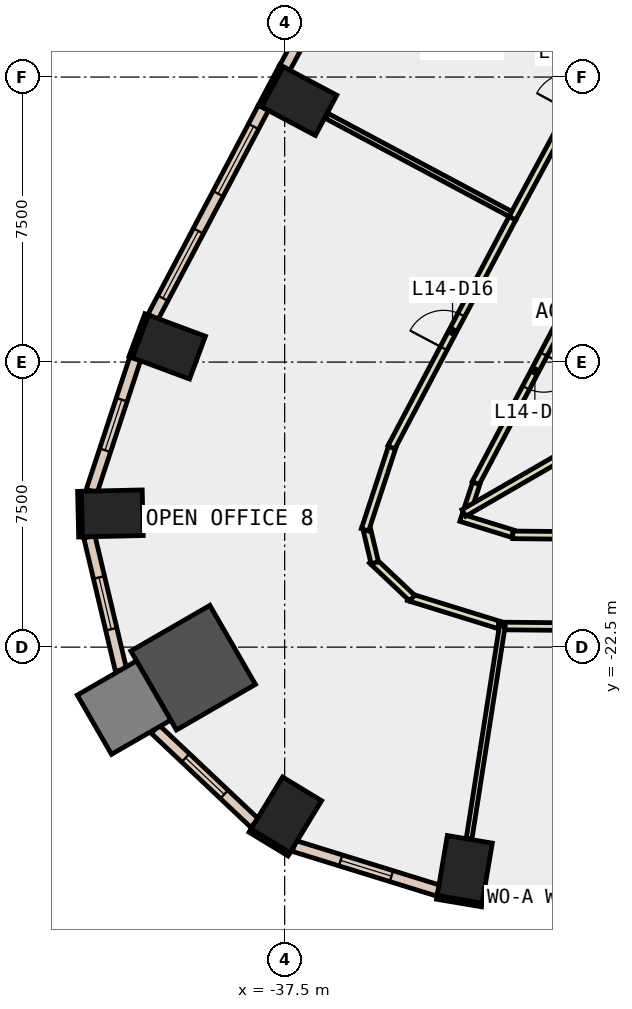
"""IFC4 building model, lengths in metres.
Left out: names, types, materials, properties, quantities, classifications, styles, units other than length and angle.
Written with IfcOpenShell. Run it as: python <this file> out.ifc"""

import sys

from ifc_helpers import new_model, si_unit, direction, frame, frame_2d, origin, origin_2d, place, context, subcontext, project, spatial, rectangle, extrude, element, fill, save


model = new_model("IFC4")
c1 = context("Model", 3, precision=1e-05, world=origin(), true_north=direction((0.0, 1.0)))
c2 = subcontext(c1, "Body", "Model", "MODEL_VIEW")
j1 = project(units=[si_unit("LENGTHUNIT", "METRE"), si_unit("PLANEANGLEUNIT", "RADIAN")], contexts=[c1])
p1 = place(None, origin())
s1 = spatial("IfcSite", under=j1, at=p1, CompositionType="ELEMENT")
p2 = place(p1, origin())
s2 = spatial("IfcBuilding", under=s1, at=p2, CompositionType="ELEMENT")
p3 = place(p2, frame((0.0, 0.0, 68.6)))
s3 = spatial("IfcBuildingStorey", under=s2, at=p3, CompositionType="ELEMENT", Elevation=68.6)
for number, where, z_axis, x_axis in (
    (1, (-32.761, -28.346, -0.4), (0.0, 0.0, 1.0), (-0.986, 0.167, 0.0)),
    (2, (-37.117, -8.132, -0.4), (0.0, 0.0, 1.0), (0.469, 0.883, 0.0)),
    (3, (-40.544, -14.604, -0.4), (0.0, 0.0, 1.0), (0.348, 0.937, 0.0)),
    (4, (-42.035, -18.982, -0.4), (0.0, 0.0, 1.0), (-0.023, 1.0, 0.0)),
):
    element("IfcColumn", number, at=place(p3, frame(where, z_axis=z_axis, x_axis=x_axis)), inside=s3, PredefinedType="COLUMN", context=c2, shape_type="SweptSolid", body=[
        extrude(rectangle(XDim=1.2, YDim=1.6, at=origin_2d()), origin(), (0.0, 0.0, 1.0), 4.2),
    ])
p4 = place(p3, frame((-39.908, -23.041, -0.4), z_axis=(0.0, 0.0, 1.0), x_axis=(0.866025403784, 0.5, 0.0)))
e5 = element("IfcColumn", 5, at=p4, inside=s3, PredefinedType="COLUMN", context=c2, shape_type="SweptSolid", body=[
    extrude(rectangle(XDim=2.4, YDim=2.4, at=origin_2d()), origin(), (0.0, 0.0, 1.0), 4.2),
])
p5 = place(p3, frame((-37.457, -26.913, -0.4), z_axis=(0.0, 0.0, 1.0), x_axis=(-0.854522294989, 0.519414716163, 0.0)))
e6 = element("IfcColumn", 6, at=p5, inside=s3, PredefinedType="COLUMN", context=c2, shape_type="SweptSolid", body=[
    extrude(rectangle(XDim=1.2, YDim=1.6, at=origin_2d()), origin(), (0.0, 0.0, 1.0), 4.2),
])
p6 = place(p3, frame((-41.727, -24.091, -0.4), z_axis=(0.0, 0.0, 1.0), x_axis=(0.866025403784, 0.5, 0.0)))
e7 = element("IfcColumn", 7, at=p6, inside=s3, PredefinedType="COLUMN", context=c2, shape_type="SweptSolid", body=[
    extrude(rectangle(XDim=1.8, YDim=1.8, at=origin_2d()), origin(), (0.0, 0.0, 1.0), 4.2),
])
p7 = place(p3, frame((-37.586, -7.204, 0.0), z_axis=(0.0, 0.0, 1.0), x_axis=(-0.469467784567, -0.882949601763, 0.0)))
e8 = element("IfcWall", 8, at=p7, inside=s3, PredefinedType="STANDARD", context=c2, shape_type="SweptSolid", body=[
    extrude(rectangle(XDim=1.199, YDim=0.1, at=frame_2d((0.6, 0.0))), origin(), (0.0, 0.0, 1.0), 3.8),
])
p8 = place(p3, frame((-41.132, -13.746, 0.0), z_axis=(0.0, 0.0, 1.0), x_axis=(-0.348268249601, -0.937394914814, 0.0)))
e9 = element("IfcWall", 9, at=p8, inside=s3, PredefinedType="STANDARD", context=c2, shape_type="SweptSolid", body=[
    extrude(rectangle(XDim=1.2, YDim=0.1, at=frame_2d((0.6, 0.0))), origin(), (0.0, 0.0, 1.0), 3.8),
])
p9 = place(p3, frame((-33.494, -29.084, 0.0), z_axis=(0.0, 0.0, 1.0), x_axis=(0.986011774526, -0.166675674579, 0.0)))
e10 = element("IfcWall", 10, at=p9, inside=s3, PredefinedType="STANDARD", context=c2, shape_type="SweptSolid", body=[
    extrude(rectangle(XDim=1.2, YDim=0.1, at=frame_2d((0.6, 0.0))), origin(), (0.0, 0.0, 1.0), 3.8),
])
p10 = place(p3, frame((-42.899, -18.401, 0.0), z_axis=(0.0, 0.0, 1.0), x_axis=(0.023183352363, -0.999731229968, 0.0)))
e11 = element("IfcWall", 11, at=p10, inside=s3, PredefinedType="STANDARD", context=c2, shape_type="SweptSolid", body=[
    extrude(rectangle(XDim=1.2, YDim=0.1, at=frame_2d((0.6, 0.0))), origin(), (0.0, 0.0, 1.0), 3.8),
])
p11 = place(p3, frame((-38.411, -27.328, 0.0), z_axis=(0.0, 0.0, 1.0), x_axis=(0.854716608594, -0.519094903649, 0.0)))
e12 = element("IfcWall", 12, at=p11, inside=s3, PredefinedType="STANDARD", context=c2, shape_type="SweptSolid", body=[
    extrude(rectangle(XDim=1.2, YDim=0.1, at=frame_2d((0.6, 0.0))), origin(), (0.0, 0.0, 1.0), 3.8),
])
p12 = place(p3, frame((-32.279, -29.089, 0.0), z_axis=(0.0, 0.0, 1.0), x_axis=(0.999952253205, -0.009771965572, 0.0)))
e13 = element("IfcWall", 13, at=p12, inside=s3, PredefinedType="STANDARD", context=c2, shape_type="SweptSolid", body=[
    extrude(rectangle(XDim=7.145, YDim=0.3, at=frame_2d((3.573, 0.0))), origin(), (0.0, 0.0, 1.0), 3.8),
])
p13 = place(p12, frame((0.586, 0.0, 0.9)))
e14 = element("IfcOpeningElement", 14, at=p13, cuts=e13, PredefinedType="OPENING", context=c2, shape_type="SweptSolid", body=[
    extrude(rectangle(XDim=2.4, YDim=2.6, at=frame_2d((1.2, 1.3))), frame((0.0, 0.16, 0.0), z_axis=(0.0, -1.0, 0.0), x_axis=(1.0, 0.0, 0.0)), (0.0, 0.0, 1.0), 0.32),
])
p14 = place(p12, frame((4.159, 0.0, 0.9)))
e15 = element("IfcOpeningElement", 15, at=p14, cuts=e13, PredefinedType="OPENING", context=c2, shape_type="SweptSolid", body=[
    extrude(rectangle(XDim=2.4, YDim=2.6, at=frame_2d((1.2, 1.3))), frame((0.0, 0.16, 0.0), z_axis=(0.0, -1.0, 0.0), x_axis=(1.0, 0.0, 0.0)), (0.0, 0.0, 1.0), 0.32),
])
p15 = place(p3, frame((-34.583, -1.864, 0.0), z_axis=(0.0, 0.0, 1.0), x_axis=(-0.475413659872, -0.879762383833, 0.0)))
e16 = element("IfcWall", 16, at=p15, inside=s3, PredefinedType="STANDARD", context=c2, shape_type="SweptSolid", body=[
    extrude(rectangle(XDim=6.125, YDim=0.3, at=frame_2d((3.063, 0.0))), origin(), (0.0, 0.0, 1.0), 3.8),
])
p16 = place(p15, frame((0.531, 0.0, 0.9)))
e17 = element("IfcOpeningElement", 17, at=p16, cuts=e16, PredefinedType="OPENING", context=c2, shape_type="SweptSolid", body=[
    extrude(rectangle(XDim=2.0, YDim=2.6, at=frame_2d((1.0, 1.3))), frame((0.0, 0.16, 0.0), z_axis=(0.0, -1.0, 0.0), x_axis=(1.0, 0.0, 0.0)), (0.0, 0.0, 1.0), 0.32),
])
p17 = place(p15, frame((3.594, 0.0, 0.9)))
e18 = element("IfcOpeningElement", 18, at=p17, cuts=e16, PredefinedType="OPENING", context=c2, shape_type="SweptSolid", body=[
    extrude(rectangle(XDim=2.0, YDim=2.6, at=frame_2d((1.0, 1.3))), frame((0.0, 0.16, 0.0), z_axis=(0.0, -1.0, 0.0), x_axis=(1.0, 0.0, 0.0)), (0.0, 0.0, 1.0), 0.32),
])
p18 = place(p3, frame((-38.059, -8.31, 0.0), z_axis=(0.0, 0.0, 1.0), x_axis=(-0.467041710902, -0.884235285587, 0.0)))
e19 = element("IfcWall", 19, at=p18, inside=s3, PredefinedType="STANDARD", context=c2, shape_type="SweptSolid", body=[
    extrude(rectangle(XDim=6.22, YDim=0.3, at=frame_2d((3.11, 0.0))), origin(), (0.0, 0.0, 1.0), 3.8),
])
p19 = place(p18, frame((0.555, 0.0, 0.9)))
e20 = element("IfcOpeningElement", 20, at=p19, cuts=e19, PredefinedType="OPENING", context=c2, shape_type="SweptSolid", body=[
    extrude(rectangle(XDim=2.0, YDim=2.6, at=frame_2d((1.0, 1.3))), frame((0.0, 0.16, 0.0), z_axis=(0.0, -1.0, 0.0), x_axis=(1.0, 0.0, 0.0)), (0.0, 0.0, 1.0), 0.32),
])
p20 = place(p18, frame((3.665, 0.0, 0.9)))
e21 = element("IfcOpeningElement", 21, at=p20, cuts=e19, PredefinedType="OPENING", context=c2, shape_type="SweptSolid", body=[
    extrude(rectangle(XDim=2.0, YDim=2.6, at=frame_2d((1.0, 1.3))), frame((0.0, 0.16, 0.0), z_axis=(0.0, -1.0, 0.0), x_axis=(1.0, 0.0, 0.0)), (0.0, 0.0, 1.0), 0.32),
])
p21 = place(p3, frame((-41.434, -14.913, 0.0), z_axis=(0.0, 0.0, 1.0), x_axis=(-0.31208801137, -0.95005319491, 0.0)))
e22 = element("IfcWall", 22, at=p21, inside=s3, PredefinedType="STANDARD", context=c2, shape_type="SweptSolid", body=[
    extrude(rectangle(XDim=3.665, YDim=0.3, at=frame_2d((1.833, 0.0))), origin(), (0.0, 0.0, 1.0), 3.8),
])
p22 = place(p21, frame((1.133, 0.0, 0.9)))
e23 = element("IfcOpeningElement", 23, at=p22, cuts=e22, PredefinedType="OPENING", context=c2, shape_type="SweptSolid", body=[
    extrude(rectangle(XDim=1.4, YDim=2.6, at=frame_2d((0.7, 1.3))), frame((0.0, 0.16, 0.0), z_axis=(0.0, -1.0, 0.0), x_axis=(1.0, 0.0, 0.0)), (0.0, 0.0, 1.0), 0.32),
])
p23 = place(p3, frame((-42.64, -19.595, 0.0), z_axis=(0.0, 0.0, 1.0), x_axis=(0.230893603767, -0.972979004778, 0.0)))
e24 = element("IfcWall", 24, at=p23, inside=s3, PredefinedType="STANDARD", context=c2, shape_type="SweptSolid", body=[
    extrude(rectangle(XDim=3.603, YDim=0.3, at=frame_2d((1.801, 0.0))), origin(), (0.0, 0.0, 1.0), 3.8),
])
p24 = place(p23, frame((1.101, 0.0, 0.9)))
e25 = element("IfcOpeningElement", 25, at=p24, cuts=e24, PredefinedType="OPENING", context=c2, shape_type="SweptSolid", body=[
    extrude(rectangle(XDim=1.4, YDim=2.6, at=frame_2d((0.7, 1.3))), frame((0.0, 0.16, 0.0), z_axis=(0.0, -1.0, 0.0), x_axis=(1.0, 0.0, 0.0)), (0.0, 0.0, 1.0), 0.32),
])
p25 = place(p3, frame((-40.909, -24.657, 0.0), z_axis=(0.0, 0.0, 1.0), x_axis=(0.727082698591, -0.686549888508, 0.0)))
e26 = element("IfcWall", 26, at=p25, inside=s3, PredefinedType="STANDARD", context=c2, shape_type="SweptSolid", body=[
    extrude(rectangle(XDim=3.602, YDim=0.3, at=frame_2d((1.801, 0.0))), origin(), (0.0, 0.0, 1.0), 3.8),
])
p26 = place(p25, frame((1.101, 0.0, 0.9)))
e27 = element("IfcOpeningElement", 27, at=p26, cuts=e26, PredefinedType="OPENING", context=c2, shape_type="SweptSolid", body=[
    extrude(rectangle(XDim=1.4, YDim=2.6, at=frame_2d((0.7, 1.3))), frame((0.0, 0.16, 0.0), z_axis=(0.0, -1.0, 0.0), x_axis=(1.0, 0.0, 0.0)), (0.0, 0.0, 1.0), 0.32),
])
p27 = place(p3, frame((-37.254, -27.732, 0.0), z_axis=(0.0, 0.0, 1.0), x_axis=(0.955308230541, -0.295611543518, 0.0)))
e28 = element("IfcWall", 28, at=p27, inside=s3, PredefinedType="STANDARD", context=c2, shape_type="SweptSolid", body=[
    extrude(rectangle(XDim=3.968, YDim=0.3, at=frame_2d((1.984, 0.0))), origin(), (0.0, 0.0, 1.0), 3.8),
])
p28 = place(p27, frame((1.284, 0.0, 0.9)))
e29 = element("IfcOpeningElement", 29, at=p28, cuts=e28, PredefinedType="OPENING", context=c2, shape_type="SweptSolid", body=[
    extrude(rectangle(XDim=1.4, YDim=2.6, at=frame_2d((0.7, 1.3))), frame((0.0, 0.16, 0.0), z_axis=(0.0, -1.0, 0.0), x_axis=(1.0, 0.0, 0.0)), (0.0, 0.0, 1.0), 0.32),
])
p29 = place(p3, frame((-29.356, -12.281, 0.0), z_axis=(0.0, 0.0, 1.0), x_axis=(-0.467123190417, -0.884192244353, 0.0)))
e30 = element("IfcWall", 30, at=p29, inside=s3, PredefinedType="PARTITIONING", context=c2, shape_type="SweptSolid", body=[
    extrude(rectangle(XDim=6.677, YDim=0.2, at=frame_2d((3.339, 0.0))), origin(), (0.0, 0.0, 1.0), 3.8),
])
p30 = place(p29, frame((2.839, 0.0, 0.0)))
e31 = element("IfcOpeningElement", 31, at=p30, cuts=e30, PredefinedType="OPENING", context=c2, shape_type="SweptSolid", body=[
    extrude(rectangle(XDim=1.0, YDim=2.1, at=frame_2d((0.5, 1.05))), frame((0.0, 0.11, 0.0), z_axis=(0.0, -1.0, 0.0), x_axis=(1.0, 0.0, 0.0)), (0.0, 0.0, 1.0), 0.22),
])
p31 = place(p3, frame((-32.459, -18.191, 0.0), z_axis=(0.0, 0.0, 1.0), x_axis=(-0.312158013001, -0.950030196846, 0.0)))
e32 = element("IfcWall", 32, at=p31, inside=s3, PredefinedType="PARTITIONING", context=c2, shape_type="SweptSolid", body=[
    extrude(rectangle(XDim=0.666, YDim=0.2, at=frame_2d((0.333, 0.0))), origin(), (0.0, 0.0, 1.0), 3.8),
])
p32 = place(p3, frame((-32.861, -19.095, 0.0), z_axis=(0.0, 0.0, 1.0), x_axis=(0.955301951006, -0.29563183591, 0.0)))
e33 = element("IfcWall", 33, at=p32, inside=s3, PredefinedType="PARTITIONING", context=c2, shape_type="SweptSolid", body=[
    extrude(rectangle(XDim=1.431, YDim=0.2, at=frame_2d((0.716, 0.0))), origin(), (0.0, 0.0, 1.0), 3.8),
])
p33 = place(p3, frame((-31.498, -19.546, 0.0), z_axis=(0.0, 0.0, 1.0), x_axis=(0.999950985372, -0.009900851195, 0.0)))
e34 = element("IfcWall", 34, at=p33, inside=s3, PredefinedType="PARTITIONING", context=c2, shape_type="SweptSolid", body=[
    extrude(rectangle(XDim=6.978, YDim=0.2, at=frame_2d((3.489, 0.0))), origin(), (0.0, 0.0, 1.0), 3.8),
])
p34 = place(p3, frame((-31.509, -11.216, 0.0), z_axis=(0.0, 0.0, 1.0), x_axis=(0.475367159168, 0.879787510701, 0.0)))
e35 = element("IfcWall", 35, at=p34, inside=s3, PredefinedType="PARTITIONING", context=c2, shape_type="SweptSolid", body=[
    extrude(rectangle(XDim=7.257, YDim=0.2, at=frame_2d((3.629, 0.0))), origin(), (0.0, 0.0, 1.0), 3.8),
])
p35 = place(p34, frame((3.203, 0.0, 0.0)))
e36 = element("IfcOpeningElement", 36, at=p35, cuts=e35, PredefinedType="OPENING", context=c2, shape_type="SweptSolid", body=[
    extrude(rectangle(XDim=1.0, YDim=2.1, at=frame_2d((0.5, 1.05))), frame((0.0, 0.11, 0.0), z_axis=(0.0, -1.0, 0.0), x_axis=(1.0, 0.0, 0.0)), (0.0, 0.0, 1.0), 0.22),
])
p36 = place(p3, frame((-31.868, -21.914, 0.0), z_axis=(0.0, 0.0, 1.0), x_axis=(-0.955329505989, 0.295542780299, 0.0)))
e37 = element("IfcWall", 37, at=p36, inside=s3, PredefinedType="PARTITIONING", context=c2, shape_type="SweptSolid", body=[
    extrude(rectangle(XDim=2.484, YDim=0.2, at=frame_2d((1.242, 0.0))), origin(), (0.0, 0.0, 1.0), 3.8),
])
p37 = place(p3, frame((-34.146, -21.209, 0.0), z_axis=(0.0, 0.0, 1.0), x_axis=(-0.727092478665, 0.686539530885, 0.0)))
e38 = element("IfcWall", 38, at=p37, inside=s3, PredefinedType="PARTITIONING", context=c2, shape_type="SweptSolid", body=[
    extrude(rectangle(XDim=1.451, YDim=0.2, at=frame_2d((0.726, 0.0))), origin(), (0.0, 0.0, 1.0), 3.8),
])
p38 = place(p3, frame((-35.129, -20.281, 0.0), z_axis=(0.0, 0.0, 1.0), x_axis=(-0.230392306785, 0.973097829087, 0.0)))
e39 = element("IfcWall", 39, at=p38, inside=s3, PredefinedType="PARTITIONING", context=c2, shape_type="SweptSolid", body=[
    extrude(rectangle(XDim=0.986, YDim=0.2, at=frame_2d((0.493, 0.0))), origin(), (0.0, 0.0, 1.0), 3.8),
])
p39 = place(p3, frame((-35.387, -19.416, 0.0), z_axis=(0.0, 0.0, 1.0), x_axis=(0.31172635658, 0.950171920556, 0.0)))
e40 = element("IfcWall", 40, at=p39, inside=s3, PredefinedType="PARTITIONING", context=c2, shape_type="SweptSolid", body=[
    extrude(rectangle(XDim=2.345, YDim=0.2, at=frame_2d((1.172, 0.0))), origin(), (0.0, 0.0, 1.0), 3.8),
])
p40 = place(p3, frame((-34.692, -17.243, 0.0), z_axis=(0.0, 0.0, 1.0), x_axis=(0.467102540817, 0.884203153332, 0.0)))
e41 = element("IfcWall", 41, at=p40, inside=s3, PredefinedType="PARTITIONING", context=c2, shape_type="SweptSolid", body=[
    extrude(rectangle(XDim=6.816, YDim=0.2, at=frame_2d((3.408, 0.0))), origin(), (0.0, 0.0, 1.0), 3.8),
])
p41 = place(p40, frame((2.946, 0.0, 0.0)))
e42 = element("IfcOpeningElement", 42, at=p41, cuts=e41, PredefinedType="OPENING", context=c2, shape_type="SweptSolid", body=[
    extrude(rectangle(XDim=1.0, YDim=2.1, at=frame_2d((0.5, 1.05))), frame((0.0, 0.11, 0.0), z_axis=(0.0, -1.0, 0.0), x_axis=(1.0, 0.0, 0.0)), (0.0, 0.0, 1.0), 0.22),
])
p42 = place(p3, frame((-24.525, -22.015, 0.0), z_axis=(0.0, 0.0, 1.0), x_axis=(-0.999952295614, 0.009767624922, 0.0)))
e43 = element("IfcWall", 43, at=p42, inside=s3, PredefinedType="PARTITIONING", context=c2, shape_type="SweptSolid", body=[
    extrude(rectangle(XDim=7.348, YDim=0.2, at=frame_2d((3.674, 0.0))), origin(), (0.0, 0.0, 1.0), 3.8),
])
p43 = place(p3, frame((-26.064, -15.088, 0.0), z_axis=(0.0, 0.0, 1.0), x_axis=(-0.865982841629, -0.500073712571, 0.0)))
e44 = element("IfcWall", 44, at=p43, inside=s3, PredefinedType="PARTITIONING", context=c2, shape_type="SweptSolid", body=[
    extrude(rectangle(XDim=7.761, YDim=0.2, at=frame_2d((3.88, 0.0))), origin(), (0.0, 0.0, 1.0), 3.8),
])
p44 = place(p3, frame((-31.561, -11.103, 0.0), z_axis=(0.0, 0.0, 1.0), x_axis=(-0.882056805494, 0.47114306944, 0.0)))
e45 = element("IfcWall", 45, at=p44, inside=s3, PredefinedType="PARTITIONING", context=c2, shape_type="SweptSolid", body=[
    extrude(rectangle(XDim=5.48, YDim=0.15, at=frame_2d((2.74, 0.0))), origin(), (0.0, 0.0, 1.0), 3.8),
])
p45 = place(p3, frame((-31.773, -21.944, 0.0), z_axis=(0.0, 0.0, 1.0), x_axis=(-0.154313693693, -0.988021904585, 0.0)))
e46 = element("IfcWall", 46, at=p45, inside=s3, PredefinedType="PARTITIONING", context=c2, shape_type="SweptSolid", body=[
    extrude(rectangle(XDim=5.658, YDim=0.15, at=frame_2d((2.829, 0.0))), origin(), (0.0, 0.0, 1.0), 3.8),
])
p46 = place(p13, origin())
e47 = element("IfcWindow", 47, at=p46, inside=s3, PartitioningType="SINGLE_PANEL", PredefinedType="WINDOW", context=c2, shape_type="SweptSolid", body=[
    extrude(rectangle(XDim=2.4, YDim=2.6, at=frame_2d((1.2, 1.3))), frame((0.0, 0.03, 0.0), z_axis=(0.0, -1.0, 0.0), x_axis=(1.0, 0.0, 0.0)), (0.0, 0.0, 1.0), 0.06),
])
fill(e14, e47)
p47 = place(p19, origin())
e48 = element("IfcWindow", 48, at=p47, inside=s3, PartitioningType="SINGLE_PANEL", PredefinedType="WINDOW", context=c2, shape_type="SweptSolid", body=[
    extrude(rectangle(XDim=2.0, YDim=2.6, at=frame_2d((1.0, 1.3))), frame((0.0, 0.03, 0.0), z_axis=(0.0, -1.0, 0.0), x_axis=(1.0, 0.0, 0.0)), (0.0, 0.0, 1.0), 0.06),
])
fill(e20, e48)
p48 = place(p20, origin())
e49 = element("IfcWindow", 49, at=p48, inside=s3, PartitioningType="SINGLE_PANEL", PredefinedType="WINDOW", context=c2, shape_type="SweptSolid", body=[
    extrude(rectangle(XDim=2.0, YDim=2.6, at=frame_2d((1.0, 1.3))), frame((0.0, 0.03, 0.0), z_axis=(0.0, -1.0, 0.0), x_axis=(1.0, 0.0, 0.0)), (0.0, 0.0, 1.0), 0.06),
])
fill(e21, e49)
p49 = place(p22, origin())
e50 = element("IfcWindow", 50, at=p49, inside=s3, PartitioningType="SINGLE_PANEL", PredefinedType="WINDOW", context=c2, shape_type="SweptSolid", body=[
    extrude(rectangle(XDim=1.4, YDim=2.6, at=frame_2d((0.7, 1.3))), frame((0.0, 0.03, 0.0), z_axis=(0.0, -1.0, 0.0), x_axis=(1.0, 0.0, 0.0)), (0.0, 0.0, 1.0), 0.06),
])
fill(e23, e50)
p50 = place(p24, origin())
e51 = element("IfcWindow", 51, at=p50, inside=s3, PartitioningType="SINGLE_PANEL", PredefinedType="WINDOW", context=c2, shape_type="SweptSolid", body=[
    extrude(rectangle(XDim=1.4, YDim=2.6, at=frame_2d((0.7, 1.3))), frame((0.0, 0.03, 0.0), z_axis=(0.0, -1.0, 0.0), x_axis=(1.0, 0.0, 0.0)), (0.0, 0.0, 1.0), 0.06),
])
fill(e25, e51)
p51 = place(p26, origin())
e52 = element("IfcWindow", 52, at=p51, inside=s3, PartitioningType="SINGLE_PANEL", PredefinedType="WINDOW", context=c2, shape_type="SweptSolid", body=[
    extrude(rectangle(XDim=1.4, YDim=2.6, at=frame_2d((0.7, 1.3))), frame((0.0, 0.03, 0.0), z_axis=(0.0, -1.0, 0.0), x_axis=(1.0, 0.0, 0.0)), (0.0, 0.0, 1.0), 0.06),
])
fill(e27, e52)
p52 = place(p28, origin())
e53 = element("IfcWindow", 53, at=p52, inside=s3, PartitioningType="SINGLE_PANEL", PredefinedType="WINDOW", context=c2, shape_type="SweptSolid", body=[
    extrude(rectangle(XDim=1.4, YDim=2.6, at=frame_2d((0.7, 1.3))), frame((0.0, 0.03, 0.0), z_axis=(0.0, -1.0, 0.0), x_axis=(1.0, 0.0, 0.0)), (0.0, 0.0, 1.0), 0.06),
])
fill(e29, e53)
p53 = place(p41, origin())
e54 = element("IfcDoor", 54, at=p53, inside=s3, OperationType="SINGLE_SWING_LEFT", PredefinedType="DOOR", context=c2, shape_type="SweptSolid", body=[
    extrude(rectangle(XDim=1.0, YDim=2.1, at=frame_2d((0.5, 1.05))), frame((0.0, 0.025, 0.0), z_axis=(0.0, -1.0, 0.0), x_axis=(1.0, 0.0, 0.0)), (0.0, 0.0, 1.0), 0.05),
])
fill(e42, e54)
p54 = place(p30, origin())
e55 = element("IfcDoor", 55, at=p54, inside=s3, OperationType="SINGLE_SWING_LEFT", PredefinedType="DOOR", context=c2, shape_type="SweptSolid", body=[
    extrude(rectangle(XDim=1.0, YDim=2.1, at=frame_2d((0.5, 1.05))), frame((0.0, 0.025, 0.0), z_axis=(0.0, -1.0, 0.0), x_axis=(1.0, 0.0, 0.0)), (0.0, 0.0, 1.0), 0.05),
])
fill(e31, e55)
save(model, sys.argv[1])
